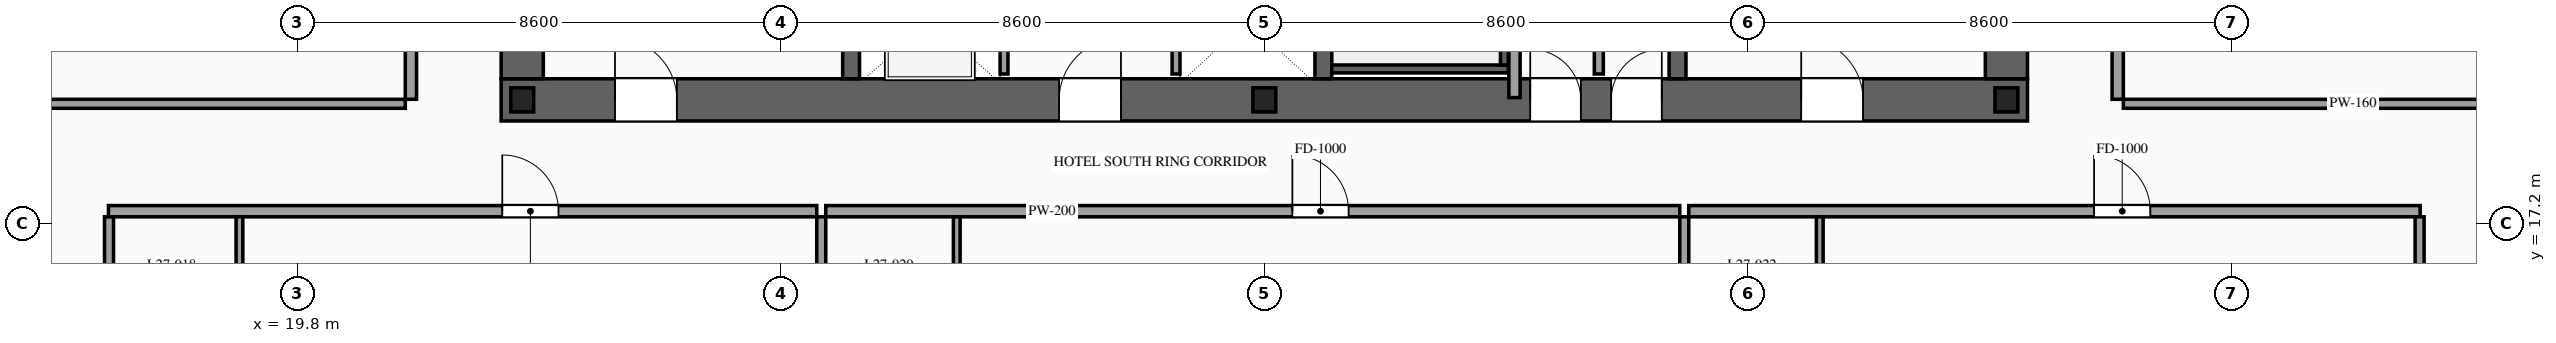
"""IFC4 building model, lengths in metres.
Left out: names, types, materials, properties, quantities, classifications, styles, units other than length and angle.
Written with IfcOpenShell. Run it as: python <this file> out.ifc"""

import sys

from ifc_helpers import new_model, si_unit, direction, frame, frame_2d, origin, origin_2d, place, context, subcontext, project, spatial, rectangle, i_section, extrude, source, transform, mapped, element, fill, save


model = new_model("IFC4")
c1 = context("Model", 3, precision=1e-05, world=origin(), true_north=direction((0.0, 1.0)))
c2 = subcontext(c1, "Body", "Model", "MODEL_VIEW")
j1 = project(units=[si_unit("LENGTHUNIT", "METRE"), si_unit("PLANEANGLEUNIT", "RADIAN")], contexts=[c1])
p1 = place(None, origin())
s1 = spatial("IfcSite", under=j1, at=p1, CompositionType="ELEMENT")
p2 = place(p1, origin())
s2 = spatial("IfcBuilding", under=s1, at=p2, CompositionType="ELEMENT")
p3 = place(p2, frame((0.0, 0.0, 104.6)))
s3 = spatial("IfcBuildingStorey", under=s2, at=p3, CompositionType="ELEMENT", Elevation=104.6)
p4 = place(p3, frame((23.425, 19.4, 0.0), z_axis=(0.0, 0.0, 1.0), x_axis=(1.0, 0.0, 0.0)))
e1 = element("IfcWall", 1, at=p4, inside=s3, PredefinedType="SHEAR", context=c2, shape_type="SweptSolid", body=[
    extrude(rectangle(XDim=27.15, YDim=0.75, at=frame_2d((13.575, 0.0))), origin(), (0.0, 0.0, 1.0), 3.6),
])
p5 = place(p4, frame((2.025, 0.0, 0.0)))
e2 = element("IfcOpeningElement", 2, at=p5, cuts=e1, PredefinedType="OPENING", context=c2, shape_type="SweptSolid", body=[
    extrude(rectangle(XDim=1.1, YDim=2.2, at=frame_2d((0.55, 1.1))), frame((0.0, 0.39, 0.0), z_axis=(0.0, -1.0, 0.0), x_axis=(1.0, 0.0, 0.0)), (0.0, 0.0, 1.0), 0.78),
])
p6 = place(p4, frame((9.925, 0.0, 0.0)))
e3 = element("IfcOpeningElement", 3, at=p6, cuts=e1, PredefinedType="OPENING", context=c2, shape_type="SweptSolid", body=[
    extrude(rectangle(XDim=1.1, YDim=2.2, at=frame_2d((0.55, 1.1))), frame((0.0, 0.39, 0.0), z_axis=(0.0, -1.0, 0.0), x_axis=(1.0, 0.0, 0.0)), (0.0, 0.0, 1.0), 0.78),
])
p7 = place(p4, frame((23.125, 0.0, 0.0)))
e4 = element("IfcOpeningElement", 4, at=p7, cuts=e1, PredefinedType="OPENING", context=c2, shape_type="SweptSolid", body=[
    extrude(rectangle(XDim=1.1, YDim=2.2, at=frame_2d((0.55, 1.1))), frame((0.0, 0.39, 0.0), z_axis=(0.0, -1.0, 0.0), x_axis=(1.0, 0.0, 0.0)), (0.0, 0.0, 1.0), 0.78),
])
p8 = place(p4, frame((19.745, 0.0, 0.0)))
e5 = element("IfcOpeningElement", 5, at=p8, cuts=e1, PredefinedType="OPENING", context=c2, shape_type="SweptSolid", body=[
    extrude(rectangle(XDim=0.9, YDim=2.15, at=frame_2d((0.45, 1.075))), frame((0.0, 0.39, 0.0), z_axis=(0.0, -1.0, 0.0), x_axis=(1.0, 0.0, 0.0)), (0.0, 0.0, 1.0), 0.78),
])
p9 = place(p4, frame((18.305, 0.0, 0.0)))
e6 = element("IfcOpeningElement", 6, at=p9, cuts=e1, PredefinedType="OPENING", context=c2, shape_type="SweptSolid", body=[
    extrude(rectangle(XDim=0.9, YDim=2.15, at=frame_2d((0.45, 1.075))), frame((0.0, 0.39, 0.0), z_axis=(0.0, -1.0, 0.0), x_axis=(1.0, 0.0, 0.0)), (0.0, 0.0, 1.0), 0.78),
])
m1 = source(origin(), c2, "Body", "SweptSolid", [
    extrude(rectangle(XDim=12.05, YDim=0.75, at=frame_2d((6.025, 0.0))), origin(), (0.0, 0.0, 1.0), 3.6),
])
for number, where, z_axis, x_axis in (
    (7, (23.8, 19.775, 0.0), (0.0, 0.0, 1.0), (0.0, 1.0, 0.0)),
    (8, (50.2, 19.775, 0.0), (0.0, 0.0, 1.0), (0.0, 1.0, 0.0)),
):
    element("IfcWall", number, at=place(p3, frame(where, z_axis=z_axis, x_axis=x_axis)), inside=s3, PredefinedType="SHEAR", context=c2, shape_type="MappedRepresentation", body=[
        mapped(m1, transform((0.0, 0.0, 0.0), scale=1.0)),
    ])
m2 = source(origin(), c2, "Body", "SweptSolid", [
    extrude(rectangle(XDim=12.05, YDim=0.3, at=frame_2d((6.025, 0.0))), origin(), (0.0, 0.0, 1.0), 3.6),
])
for number, where, z_axis, x_axis in (
    (9, (29.65, 19.775, 0.0), (0.0, 0.0, 1.0), (0.0, 1.0, 0.0)),
    (10, (38.05, 19.775, 0.0), (0.0, 0.0, 1.0), (0.0, 1.0, 0.0)),
    (11, (44.35, 19.775, 0.0), (0.0, 0.0, 1.0), (0.0, 1.0, 0.0)),
):
    element("IfcWall", number, at=place(p3, frame(where, z_axis=z_axis, x_axis=x_axis)), inside=s3, PredefinedType="SOLIDWALL", context=c2, shape_type="MappedRepresentation", body=[
        mapped(m2, transform((0.0, 0.0, 0.0), scale=1.0)),
    ])
m3 = source(origin(), c2, "Body", "SweptSolid", [
    extrude(i_section(OverallWidth=0.407, OverallDepth=0.428, WebThickness=0.02, FlangeThickness=0.035, at=origin_2d()), origin(), (0.0, 0.0, 1.0), 3.6),
])
for number, where, z_axis, x_axis in (
    (12, (23.8, 19.4, 0.0), (0.0, 0.0, 1.0), (1.0, 0.0, 0.0)),
    (13, (37.0, 19.4, 0.0), (0.0, 0.0, 1.0), (1.0, 0.0, 0.0)),
    (14, (50.2, 19.4, 0.0), (0.0, 0.0, 1.0), (1.0, 0.0, 0.0)),
):
    element("IfcColumn", number, at=place(p3, frame(where, z_axis=z_axis, x_axis=x_axis)), inside=s3, PredefinedType="COLUMN", context=c2, shape_type="MappedRepresentation", body=[
        mapped(m3, transform((0.0, 0.0, 0.0), scale=1.0)),
    ])
p10 = place(p3, frame((32.37, 19.86, 0.0), z_axis=(0.0, 0.0, 1.0), x_axis=(0.0, 1.0, 0.0)))
e15 = element("IfcWall", 15, at=p10, inside=s3, PredefinedType="SOLIDWALL", context=c2, shape_type="SweptSolid", body=[
    extrude(rectangle(XDim=2.04, YDim=0.14, at=frame_2d((1.02, 0.0))), origin(), (0.0, 0.0, 1.0), 3.38),
])
p11 = place(p10, frame((0.47, 0.0, 0.0)))
e16 = element("IfcOpeningElement", 16, at=p11, cuts=e15, PredefinedType="OPENING", context=c2, shape_type="SweptSolid", body=[
    extrude(rectangle(XDim=1.1, YDim=2.2, at=frame_2d((0.55, 1.1))), frame((0.0, 0.085, 0.0), z_axis=(0.0, -1.0, 0.0), x_axis=(1.0, 0.0, 0.0)), (0.0, 0.0, 1.0), 0.17),
])
m4 = source(origin(), c2, "Body", "SweptSolid", [
    extrude(rectangle(XDim=2.04, YDim=0.14, at=frame_2d((1.02, 0.0))), origin(), (0.0, 0.0, 1.0), 3.38),
])
p12 = place(p3, frame((35.43, 19.86, 0.0), z_axis=(0.0, 0.0, 1.0), x_axis=(0.0, 1.0, 0.0)))
e17 = element("IfcWall", 17, at=p12, inside=s3, PredefinedType="SOLIDWALL", context=c2, shape_type="MappedRepresentation", body=[
    mapped(m4, transform((0.0, 0.0, 0.0), scale=1.0)),
])
m5 = source(origin(), c2, "Body", "SweptSolid", [
    extrude(rectangle(XDim=3.14, YDim=0.14, at=frame_2d((1.57, 0.0))), origin(), (0.0, 0.0, 1.0), 3.38),
])
p13 = place(p3, frame((38.2, 19.95, 0.0), z_axis=(0.0, 0.0, 1.0), x_axis=(1.0, 0.0, 0.0)))
e18 = element("IfcWall", 18, at=p13, inside=s3, PredefinedType="SOLIDWALL", context=c2, shape_type="MappedRepresentation", body=[
    mapped(m5, transform((0.0, 0.0, 0.0), scale=1.0)),
])
m6 = source(origin(), c2, "Body", "SweptSolid", [
    extrude(rectangle(XDim=8.94, YDim=0.14, at=frame_2d((4.47, 0.0))), origin(), (0.0, 0.0, 1.0), 3.38),
])
p14 = place(p3, frame((41.27, 20.02, 0.0), z_axis=(0.0, 0.0, 1.0), x_axis=(0.0, 1.0, 0.0)))
e19 = element("IfcWall", 19, at=p14, inside=s3, PredefinedType="SOLIDWALL", context=c2, shape_type="MappedRepresentation", body=[
    mapped(m6, transform((0.0, 0.0, 0.0), scale=1.0)),
])
m7 = source(origin(), c2, "Body", "SweptSolid", [
    extrude(rectangle(XDim=1.34, YDim=0.16, at=frame_2d((0.67, 0.0))), origin(), (0.0, 0.0, 1.0), 3.38),
])
p15 = place(p3, frame((42.95, 19.86, 0.0), z_axis=(0.0, 0.0, 1.0), x_axis=(0.0, 1.0, 0.0)))
e20 = element("IfcWall", 20, at=p15, inside=s3, PredefinedType="PARTITIONING", context=c2, shape_type="MappedRepresentation", body=[
    mapped(m7, transform((0.0, 0.0, 0.0), scale=1.0)),
])
m8 = source(origin(), c2, "Body", "SweptSolid", [
    extrude(rectangle(XDim=12.72, YDim=0.2, at=frame_2d((6.36, 0.0))), origin(), (0.0, 0.0, 1.0), 3.38),
])
p16 = place(p3, frame((41.45, 19.44, 0.0), z_axis=(0.0, 0.0, 1.0), x_axis=(0.0, 1.0, 0.0)))
e21 = element("IfcWall", 21, at=p16, inside=s3, PredefinedType="PARTITIONING", context=c2, shape_type="MappedRepresentation", body=[
    mapped(m8, transform((0.0, 0.0, 0.0), scale=1.0)),
])
p17 = place(p3, frame((16.44, 17.42, 0.0), z_axis=(0.0, 0.0, 1.0), x_axis=(1.0, 0.0, 0.0)))
e22 = element("IfcWall", 22, at=p17, inside=s3, PredefinedType="PARTITIONING", context=c2, shape_type="SweptSolid", body=[
    extrude(rectangle(XDim=12.599, YDim=0.2, at=frame_2d((6.3, 0.0))), origin(), (0.0, 0.0, 1.0), 3.38),
])
p18 = place(p17, frame((7.005, 0.0, 0.0)))
e23 = element("IfcOpeningElement", 23, at=p18, cuts=e22, PredefinedType="OPENING", context=c2, shape_type="SweptSolid", body=[
    extrude(rectangle(XDim=1.0, YDim=2.2, at=frame_2d((0.5, 1.1))), frame((0.0, 0.115, 0.0), z_axis=(0.0, -1.0, 0.0), x_axis=(1.0, 0.0, 0.0)), (0.0, 0.0, 1.0), 0.23),
])
m9 = source(origin(), c2, "Body", "SweptSolid", [
    extrude(rectangle(XDim=14.97, YDim=0.16, at=frame_2d((7.485, 0.0))), origin(), (0.0, 0.0, 1.0), 3.38),
])
p19 = place(p3, frame((29.119, 2.35, 0.0), z_axis=(0.0, 0.0, 1.0), x_axis=(0.0, 1.0, 0.0)))
e24 = element("IfcWall", 24, at=p19, inside=s3, PredefinedType="PARTITIONING", context=c2, shape_type="MappedRepresentation", body=[
    mapped(m9, transform((0.0, 0.0, 0.0), scale=1.0)),
])
m10 = source(origin(), c2, "Body", "SweptSolid", [
    extrude(rectangle(XDim=2.42, YDim=0.12, at=frame_2d((1.21, 0.0))), origin(), (0.0, 0.0, 1.0), 3.38),
])
p20 = place(p3, frame((18.77, 14.9, 0.0), z_axis=(0.0, 0.0, 1.0), x_axis=(0.0, 1.0, 0.0)))
e25 = element("IfcWall", 25, at=p20, inside=s3, PredefinedType="PARTITIONING", context=c2, shape_type="MappedRepresentation", body=[
    mapped(m10, transform((0.0, 0.0, 0.0), scale=1.0)),
])
p21 = place(p3, frame((29.199, 17.42, 0.0), z_axis=(0.0, 0.0, 1.0), x_axis=(1.0, 0.0, 0.0)))
e26 = element("IfcWall", 26, at=p21, inside=s3, PredefinedType="PARTITIONING", context=c2, shape_type="SweptSolid", body=[
    extrude(rectangle(XDim=15.191, YDim=0.2, at=frame_2d((7.595, 0.0))), origin(), (0.0, 0.0, 1.0), 3.38),
])
p22 = place(p21, frame((8.3, 0.0, 0.0)))
e27 = element("IfcOpeningElement", 27, at=p22, cuts=e26, PredefinedType="OPENING", context=c2, shape_type="SweptSolid", body=[
    extrude(rectangle(XDim=1.0, YDim=2.2, at=frame_2d((0.5, 1.1))), frame((0.0, 0.115, 0.0), z_axis=(0.0, -1.0, 0.0), x_axis=(1.0, 0.0, 0.0)), (0.0, 0.0, 1.0), 0.23),
])
p23 = place(p3, frame((44.47, 2.35, 0.0), z_axis=(0.0, 0.0, 1.0), x_axis=(0.0, 1.0, 0.0)))
e28 = element("IfcWall", 28, at=p23, inside=s3, PredefinedType="PARTITIONING", context=c2, shape_type="MappedRepresentation", body=[
    mapped(m9, transform((0.0, 0.0, 0.0), scale=1.0)),
])
p24 = place(p3, frame((31.529, 14.9, 0.0), z_axis=(0.0, 0.0, 1.0), x_axis=(0.0, 1.0, 0.0)))
e29 = element("IfcWall", 29, at=p24, inside=s3, PredefinedType="PARTITIONING", context=c2, shape_type="MappedRepresentation", body=[
    mapped(m10, transform((0.0, 0.0, 0.0), scale=1.0)),
])
p25 = place(p3, frame((44.55, 17.42, 0.0), z_axis=(0.0, 0.0, 1.0), x_axis=(1.0, 0.0, 0.0)))
e30 = element("IfcWall", 30, at=p25, inside=s3, PredefinedType="PARTITIONING", context=c2, shape_type="SweptSolid", body=[
    extrude(rectangle(XDim=13.01, YDim=0.2, at=frame_2d((6.505, 0.0))), origin(), (0.0, 0.0, 1.0), 3.38),
])
p26 = place(p25, frame((7.21, 0.0, 0.0)))
e31 = element("IfcOpeningElement", 31, at=p26, cuts=e30, PredefinedType="OPENING", context=c2, shape_type="SweptSolid", body=[
    extrude(rectangle(XDim=1.0, YDim=2.2, at=frame_2d((0.5, 1.1))), frame((0.0, 0.115, 0.0), z_axis=(0.0, -1.0, 0.0), x_axis=(1.0, 0.0, 0.0)), (0.0, 0.0, 1.0), 0.23),
])
m11 = source(origin(), c2, "Body", "SweptSolid", [
    extrude(rectangle(XDim=14.82, YDim=0.16, at=frame_2d((7.41, 0.0))), origin(), (0.0, 0.0, 1.0), 3.38),
])
for number, where, z_axis, x_axis in (
    (32, (16.45, 2.5, 0.0), (0.0, 0.0, 1.0), (0.0, 1.0, 0.0)),
    (33, (57.55, 2.5, 0.0), (0.0, 0.0, 1.0), (0.0, 1.0, 0.0)),
):
    element("IfcWall", number, at=place(p3, frame(where, z_axis=z_axis, x_axis=x_axis)), inside=s3, PredefinedType="PARTITIONING", context=c2, shape_type="MappedRepresentation", body=[
        mapped(m11, transform((0.0, 0.0, 0.0), scale=1.0)),
    ])
p27 = place(p3, frame((46.88, 14.9, 0.0), z_axis=(0.0, 0.0, 1.0), x_axis=(0.0, 1.0, 0.0)))
e34 = element("IfcWall", 34, at=p27, inside=s3, PredefinedType="PARTITIONING", context=c2, shape_type="MappedRepresentation", body=[
    mapped(m10, transform((0.0, 0.0, 0.0), scale=1.0)),
])
p28 = place(p3, frame((21.82, 19.41, 0.0), z_axis=(0.0, 0.0, 1.0), x_axis=(0.0, 1.0, 0.0)))
e35 = element("IfcWall", 35, at=p28, inside=s3, PredefinedType="PARTITIONING", context=c2, shape_type="SweptSolid", body=[
    extrude(rectangle(XDim=12.78, YDim=0.2, at=frame_2d((6.39, 0.0))), origin(), (0.0, 0.0, 1.0), 3.38),
])
p29 = place(p28, frame((5.89, 0.0, 0.0)))
e36 = element("IfcOpeningElement", 36, at=p29, cuts=e35, PredefinedType="OPENING", context=c2, shape_type="SweptSolid", body=[
    extrude(rectangle(XDim=1.0, YDim=2.2, at=frame_2d((0.5, 1.1))), frame((0.0, 0.115, 0.0), z_axis=(0.0, -1.0, 0.0), x_axis=(1.0, 0.0, 0.0)), (0.0, 0.0, 1.0), 0.23),
])
m12 = source(origin(), c2, "Body", "SweptSolid", [
    extrude(rectangle(XDim=8.17, YDim=0.16, at=frame_2d((4.085, 0.0))), origin(), (0.0, 0.0, 1.0), 2.875),
])
p30 = place(p3, frame((13.55, 19.33, 0.0), z_axis=(0.0, 0.0, 1.0), x_axis=(1.0, 0.0, 0.0)))
e37 = element("IfcWall", 37, at=p30, inside=s3, PredefinedType="PARTITIONING", context=c2, shape_type="MappedRepresentation", body=[
    mapped(m12, transform((0.0, 0.0, 0.0), scale=1.0)),
])
p31 = place(p3, frame((52.18, 19.41, 0.0), z_axis=(0.0, 0.0, 1.0), x_axis=(0.0, 1.0, 0.0)))
e38 = element("IfcWall", 38, at=p31, inside=s3, PredefinedType="PARTITIONING", context=c2, shape_type="SweptSolid", body=[
    extrude(rectangle(XDim=12.78, YDim=0.2, at=frame_2d((6.39, 0.0))), origin(), (0.0, 0.0, 1.0), 3.38),
])
p32 = place(p31, frame((5.89, 0.0, 0.0)))
e39 = element("IfcOpeningElement", 39, at=p32, cuts=e38, PredefinedType="OPENING", context=c2, shape_type="SweptSolid", body=[
    extrude(rectangle(XDim=1.0, YDim=2.2, at=frame_2d((0.5, 1.1))), frame((0.0, 0.115, 0.0), z_axis=(0.0, -1.0, 0.0), x_axis=(1.0, 0.0, 0.0)), (0.0, 0.0, 1.0), 0.23),
])
p33 = place(p3, frame((52.28, 19.33, 0.0), z_axis=(0.0, 0.0, 1.0), x_axis=(1.0, 0.0, 0.0)))
e40 = element("IfcWall", 40, at=p33, inside=s3, PredefinedType="PARTITIONING", context=c2, shape_type="MappedRepresentation", body=[
    mapped(m12, transform((0.0, 0.0, 0.0), scale=1.0)),
])
m13 = source(origin(), c2, "Body", "SweptSolid", [
    extrude(rectangle(XDim=1.1, YDim=2.2, at=frame_2d((0.55, 1.1))), frame((0.0, 0.025, 0.0), z_axis=(0.0, -1.0, 0.0), x_axis=(1.0, 0.0, 0.0)), (0.0, 0.0, 1.0), 0.05),
])
p34 = place(p5, origin())
e41 = element("IfcDoor", 41, at=p34, inside=s3, OperationType="SINGLE_SWING_LEFT", PredefinedType="DOOR", context=c2, shape_type="MappedRepresentation", body=[
    mapped(m13, transform((0.0, 0.0, 0.0), scale=1.0)),
])
fill(e2, e41)
p35 = place(p6, origin())
e42 = element("IfcDoor", 42, at=p35, inside=s3, OperationType="SINGLE_SWING_RIGHT", PredefinedType="DOOR", context=c2, shape_type="MappedRepresentation", body=[
    mapped(m13, transform((0.0, 0.0, 0.0), scale=1.0)),
])
fill(e3, e42)
p36 = place(p7, origin())
e43 = element("IfcDoor", 43, at=p36, inside=s3, OperationType="SINGLE_SWING_LEFT", PredefinedType="DOOR", context=c2, shape_type="MappedRepresentation", body=[
    mapped(m13, transform((0.0, 0.0, 0.0), scale=1.0)),
])
fill(e4, e43)
m14 = source(origin(), c2, "Body", "SweptSolid", [
    extrude(rectangle(XDim=0.9, YDim=2.15, at=frame_2d((0.45, 1.075))), frame((0.0, 0.025, 0.0), z_axis=(0.0, -1.0, 0.0), x_axis=(1.0, 0.0, 0.0)), (0.0, 0.0, 1.0), 0.05),
])
p37 = place(p8, origin())
e44 = element("IfcDoor", 44, at=p37, inside=s3, OperationType="SINGLE_SWING_RIGHT", PredefinedType="DOOR", context=c2, shape_type="MappedRepresentation", body=[
    mapped(m14, transform((0.0, 0.0, 0.0), scale=1.0)),
])
fill(e5, e44)
p38 = place(p9, origin())
e45 = element("IfcDoor", 45, at=p38, inside=s3, OperationType="SINGLE_SWING_LEFT", PredefinedType="DOOR", context=c2, shape_type="MappedRepresentation", body=[
    mapped(m14, transform((0.0, 0.0, 0.0), scale=1.0)),
])
fill(e6, e45)
m15 = source(origin(), c2, "Body", "SweptSolid", [
    extrude(rectangle(XDim=1.0, YDim=2.2, at=frame_2d((0.5, 1.1))), frame((0.0, 0.025, 0.0), z_axis=(0.0, -1.0, 0.0), x_axis=(1.0, 0.0, 0.0)), (0.0, 0.0, 1.0), 0.05),
])
p39 = place(p18, origin())
e46 = element("IfcDoor", 46, at=p39, inside=s3, OperationType="SINGLE_SWING_LEFT", PredefinedType="DOOR", context=c2, shape_type="MappedRepresentation", body=[
    mapped(m15, transform((0.0, 0.0, 0.0), scale=1.0)),
])
fill(e23, e46)
p40 = place(p22, origin())
e47 = element("IfcDoor", 47, at=p40, inside=s3, OperationType="SINGLE_SWING_LEFT", PredefinedType="DOOR", context=c2, shape_type="MappedRepresentation", body=[
    mapped(m15, transform((0.0, 0.0, 0.0), scale=1.0)),
])
fill(e27, e47)
p41 = place(p26, origin())
e48 = element("IfcDoor", 48, at=p41, inside=s3, OperationType="SINGLE_SWING_LEFT", PredefinedType="DOOR", context=c2, shape_type="MappedRepresentation", body=[
    mapped(m15, transform((0.0, 0.0, 0.0), scale=1.0)),
])
fill(e31, e48)
save(model, sys.argv[1])
